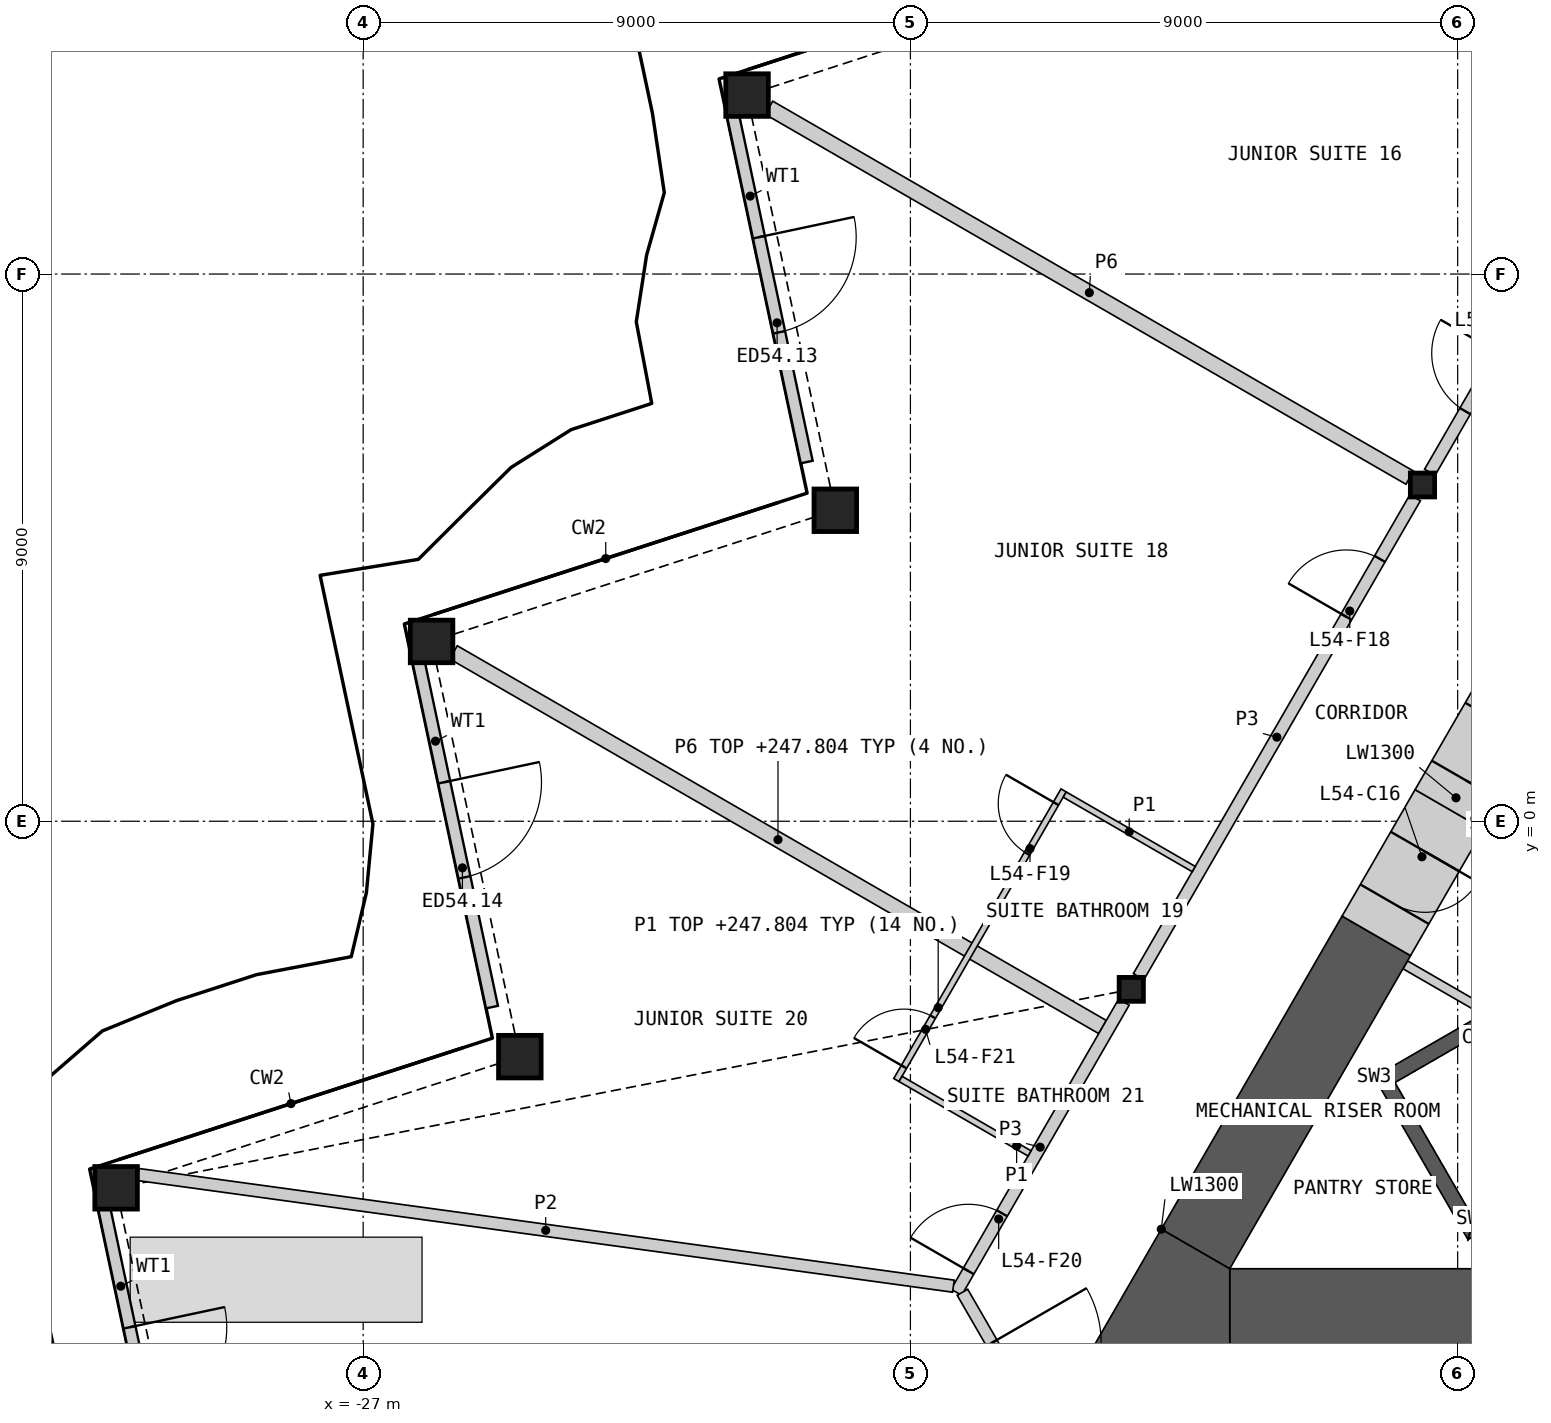
"""IFC4 building model, lengths in metres.
Left out: names, types, materials, properties, quantities, classifications, styles, units other than length and angle.
Written with IfcOpenShell. Run it as: python <this file> out.ifc"""

import sys

from ifc_helpers import new_model, si_unit, direction, frame, frame_2d, origin, origin_2d, place, context, subcontext, project, spatial, polyline, rectangle, hollow_rectangle, i_section, outline, extrude, element, fill, save


model = new_model("IFC4")
c1 = context("Model", 3, precision=1e-05, world=origin(), true_north=direction((0.0, 1.0)))
c2 = subcontext(c1, "Body", "Model", "MODEL_VIEW")
j1 = project(units=[si_unit("LENGTHUNIT", "METRE"), si_unit("PLANEANGLEUNIT", "RADIAN")], contexts=[c1])
p1 = place(None, origin())
s1 = spatial("IfcSite", under=j1, at=p1, CompositionType="ELEMENT")
p2 = place(p1, origin())
s2 = spatial("IfcBuilding", under=s1, at=p2, CompositionType="ELEMENT")
p3 = place(p2, frame((0.0, 0.0, 245.4)))
s3 = spatial("IfcBuildingStorey", under=s2, at=p3, CompositionType="ELEMENT", Elevation=245.4)
for number, where, z_axis, x_axis in (
    (1, (-20.687, 11.943, 0.0), (0.0, 0.0, 1.0), (1.0, 0.0, 0.0)),
    (2, (-19.235, 5.115, 0.0), (0.0, 0.0, 1.0), (1.0, 0.0, 0.0)),
    (3, (-25.875, 2.957, 0.0), (0.0, 0.0, 1.0), (1.0, 0.0, 0.0)),
    (4, (-24.423, -3.872, 0.0), (0.0, 0.0, 1.0), (1.0, 0.0, 0.0)),
    (5, (-31.063, -6.029, 0.0), (0.0, 0.0, 1.0), (1.0, 0.0, 0.0)),
):
    element("IfcColumn", number, at=place(p3, frame(where, z_axis=z_axis, x_axis=x_axis)), inside=s3, PredefinedType="COLUMN", context=c2, shape_type="SweptSolid", body=[
        extrude(hollow_rectangle(XDim=0.7, YDim=0.7, WallThickness=0.045, at=origin_2d()), origin(), (0.0, 0.0, 1.0), 3.6),
    ])
for number, where, z_axis, x_axis in (
    (6, (-9.578, 5.53, 0.0), (0.0, 0.0, 1.0), (1.0, 0.0, 0.0)),
    (7, (-14.368, -2.765, 0.0), (0.0, 0.0, 1.0), (1.0, 0.0, 0.0)),
):
    element("IfcColumn", number, at=place(p3, frame(where, z_axis=z_axis, x_axis=x_axis)), inside=s3, PredefinedType="COLUMN", context=c2, shape_type="SweptSolid", body=[
        extrude(i_section(OverallWidth=0.399, OverallDepth=0.393, WebThickness=0.023, FlangeThickness=0.037, at=origin_2d()), origin(), (0.0, 0.0, 1.0), 3.6),
    ])
p4 = place(p3, frame((-20.945, 11.74, 0.0), z_axis=(0.0, 0.0, 1.0), x_axis=(0.207920947907, -0.978145633033, 0.0)))
e8 = element("IfcWall", 8, at=p4, inside=s3, PredefinedType="SOLIDWALL", context=c2, shape_type="SweptSolid", body=[
    extrude(rectangle(XDim=5.963, YDim=0.2, at=frame_2d((2.981, 0.0))), origin(), (0.0, 0.0, 1.0), 2.701),
])
p5 = place(p4, frame((2.181, 0.0, 0.0)))
e9 = element("IfcOpeningElement", 9, at=p5, cuts=e8, PredefinedType="OPENING", context=c2, shape_type="SweptSolid", body=[
    extrude(rectangle(XDim=1.6, YDim=2.4, at=frame_2d((0.8, 1.2))), frame((0.0, 0.11, 0.0), z_axis=(0.0, -1.0, 0.0), x_axis=(1.0, 0.0, 0.0)), (0.0, 0.0, 1.0), 0.22),
])
p6 = place(p3, frame((-26.121, 2.775, 0.0), z_axis=(0.0, 0.0, 1.0), x_axis=(0.207881772083, -0.978153959679, 0.0)))
e10 = element("IfcWall", 10, at=p6, inside=s3, PredefinedType="SOLIDWALL", context=c2, shape_type="SweptSolid", body=[
    extrude(rectangle(XDim=5.963, YDim=0.2, at=frame_2d((2.981, 0.0))), origin(), (0.0, 0.0, 1.0), 2.701),
])
p7 = place(p6, frame((2.181, 0.0, 0.0)))
e11 = element("IfcOpeningElement", 11, at=p7, cuts=e10, PredefinedType="OPENING", context=c2, shape_type="SweptSolid", body=[
    extrude(rectangle(XDim=1.6, YDim=2.4, at=frame_2d((0.8, 1.2))), frame((0.0, 0.11, 0.0), z_axis=(0.0, -1.0, 0.0), x_axis=(1.0, 0.0, 0.0)), (0.0, 0.0, 1.0), 0.22),
])
p8 = place(p3, frame((-31.296, -6.189, 0.0), z_axis=(0.0, 0.0, 1.0), x_axis=(0.207920947907, -0.978145633033, 0.0)))
e12 = element("IfcWall", 12, at=p8, inside=s3, PredefinedType="SOLIDWALL", context=c2, shape_type="SweptSolid", body=[
    extrude(rectangle(XDim=5.963, YDim=0.2, at=frame_2d((2.981, 0.0))), origin(), (0.0, 0.0, 1.0), 2.701),
])
p9 = place(p8, frame((2.181, 0.0, 0.0)))
e13 = element("IfcOpeningElement", 13, at=p9, cuts=e12, PredefinedType="OPENING", context=c2, shape_type="SweptSolid", body=[
    extrude(rectangle(XDim=1.6, YDim=2.4, at=frame_2d((0.8, 1.2))), frame((0.0, 0.11, 0.0), z_axis=(0.0, -1.0, 0.0), x_axis=(1.0, 0.0, 0.0)), (0.0, 0.0, 1.0), 0.22),
])
p10 = place(p3, origin())
e14 = element("IfcWall", 14, at=p10, inside=s3, PredefinedType="SHEAR", context=c2, shape_type="SweptSolid", body=[
    extrude(outline(polyline([(-5.307, -1.281), (-10.374, -4.206), (-10.032, -4.298), (-5.182, -1.498), (-5.307, -1.281)])), origin(), (0.0, 0.0, 1.0), 3.25),
])
p11 = place(p3, origin())
e15 = element("IfcWall", 15, at=p11, inside=s3, PredefinedType="SHEAR", context=c2, shape_type="SweptSolid", body=[
    extrude(outline(polyline([(-10.374, -4.206), (-8.83, -6.881), (-8.738, -6.539), (-10.032, -4.298), (-10.374, -4.206)])), origin(), (0.0, 0.0, 1.0), 3.25),
])
p12 = place(p3, origin())
e16 = element("IfcWall", 16, at=p12, inside=s3, PredefinedType="SHEAR", context=c2, shape_type="SweptSolid", body=[
    extrude(outline(polyline([(-8.738, -6.539), (-8.83, -6.881), (-3.763, -3.956), (-3.888, -3.739), (-8.738, -6.539)])), origin(), (0.0, 0.0, 1.0), 3.25),
])
p13 = place(p3, frame((-9.862, -2.361, 0.0), z_axis=(0.0, 0.0, 1.0), x_axis=(0.865990094875, -0.500061151839, 0.0)))
e17 = element("IfcWall", 17, at=p13, inside=s3, PredefinedType="PARTITIONING", context=c2, shape_type="SweptSolid", body=[
    extrude(rectangle(XDim=1.56, YDim=0.15, at=frame_2d((0.78, 0.0))), origin(), (0.0, 0.0, 1.0), 3.25),
])
p14 = place(p3, frame((-12.748, -8.01, 0.0), z_axis=(0.0, 0.0, 1.0), x_axis=(1.0, 0.0, 0.0)))
e18 = element("IfcWall", 18, at=p14, inside=s3, PredefinedType="SHEAR", context=c2, shape_type="SweptSolid", body=[
    extrude(rectangle(XDim=4.26, YDim=1.3, at=frame_2d((2.13, 0.0))), origin(), (0.0, 0.0, 1.0), 3.25),
])
p15 = place(p3, frame((-10.338, -1.885, 0.0), z_axis=(0.0, 0.0, 1.0), x_axis=(-0.499975944838, -0.866039291593, 0.0)))
e19 = element("IfcWall", 19, at=p15, inside=s3, PredefinedType="SHEAR", context=c2, shape_type="SweptSolid", body=[
    extrude(rectangle(XDim=5.947, YDim=1.3, at=frame_2d((2.974, 0.0))), origin(), (0.0, 0.0, 1.0), 3.25),
])
p16 = place(p3, origin())
e20 = element("IfcWall", 20, at=p16, inside=s3, PredefinedType="SHEAR", context=c2, shape_type="SweptSolid", body=[
    extrude(outline(polyline([(-13.874, -6.71), (-12.748, -7.36), (-12.748, -8.66), (-15.0, -8.66), (-13.874, -6.71)])), origin(), (0.0, 0.0, 1.0), 3.25),
])
p17 = place(p3, frame((-9.137, 0.195, 0.0), z_axis=(0.0, 0.0, 1.0), x_axis=(-0.500009943768, -0.866019662671, 0.0)))
e21 = element("IfcWall", 21, at=p17, inside=s3, PredefinedType="SHEAR", context=c2, shape_type="SweptSolid", body=[
    extrude(rectangle(XDim=2.401, YDim=1.3, at=frame_2d((1.201, 0.0))), origin(), (0.0, 0.0, 1.0), 3.25),
])
p18 = place(p17, frame((0.8, 0.0, 0.0)))
e22 = element("IfcOpeningElement", 22, at=p18, cuts=e21, PredefinedType="OPENING", context=c2, shape_type="SweptSolid", body=[
    extrude(rectangle(XDim=1.0, YDim=2.1, at=frame_2d((0.5, 1.05))), frame((0.0, 0.66, 0.0), z_axis=(0.0, -1.0, 0.0), x_axis=(1.0, 0.0, 0.0)), (0.0, 0.0, 1.0), 1.32),
])
p19 = place(p3, frame((-8.037, 2.1, 0.0), z_axis=(0.0, 0.0, 1.0), x_axis=(-0.50002983664, -0.866008176907, 0.0)))
e23 = element("IfcWall", 23, at=p19, inside=s3, PredefinedType="SHEAR", context=c2, shape_type="SweptSolid", body=[
    extrude(rectangle(XDim=2.2, YDim=1.3, at=frame_2d((1.1, 0.0))), origin(), (0.0, 0.0, 1.0), 3.25),
])
p20 = place(p19, frame((0.55, 0.0, 0.0)))
e24 = element("IfcOpeningElement", 24, at=p20, cuts=e23, PredefinedType="OPENING", context=c2, shape_type="SweptSolid", body=[
    extrude(rectangle(XDim=1.1, YDim=2.1, at=frame_2d((0.55, 1.05))), frame((0.0, 0.66, 0.0), z_axis=(0.0, -1.0, 0.0), x_axis=(1.0, 0.0, 0.0)), (0.0, 0.0, 1.0), 1.32),
])
p21 = place(p3, frame((-25.515, 2.778, 0.0), z_axis=(0.0, 0.0, 1.0), x_axis=(0.866019666699, -0.500009936792, 0.0)))
e25 = element("IfcWall", 25, at=p21, inside=s3, PredefinedType="PARTITIONING", context=c2, shape_type="SweptSolid", body=[
    extrude(rectangle(XDim=12.325, YDim=0.25, at=frame_2d((6.163, 0.0))), origin(), (0.0, 0.0, 1.0), 2.404),
])
p22 = place(p3, frame((-20.327, 11.736, 0.0), z_axis=(0.0, 0.0, 1.0), x_axis=(0.866024549986, -0.50000147882, 0.0)))
e26 = element("IfcWall", 26, at=p22, inside=s3, PredefinedType="PARTITIONING", context=c2, shape_type="SweptSolid", body=[
    extrude(rectangle(XDim=12.169, YDim=0.25, at=frame_2d((6.084, 0.0))), origin(), (0.0, 0.0, 1.0), 2.404),
])
p23 = place(p3, frame((-14.247, -2.556, 0.0), z_axis=(0.0, 0.0, 1.0), x_axis=(0.49998193945, 0.866035830797, 0.0)))
e27 = element("IfcWall", 27, at=p23, inside=s3, PredefinedType="PARTITIONING", context=c2, shape_type="SweptSolid", body=[
    extrude(rectangle(XDim=9.094, YDim=0.2, at=frame_2d((4.547, 0.0))), origin(), (0.0, 0.0, 1.0), 3.25),
])
p24 = place(p23, frame((6.833, 0.0, 0.0)))
e28 = element("IfcOpeningElement", 28, at=p24, cuts=e27, PredefinedType="OPENING", context=c2, shape_type="SweptSolid", body=[
    extrude(rectangle(XDim=1.1, YDim=2.1, at=frame_2d((0.55, 1.05))), frame((0.0, 0.11, 0.0), z_axis=(0.0, -1.0, 0.0), x_axis=(1.0, 0.0, 0.0)), (0.0, 0.0, 1.0), 0.22),
])
p25 = place(p3, frame((-9.458, 5.74, 0.0), z_axis=(0.0, 0.0, 1.0), x_axis=(0.50000207303, 0.866024206917, 0.0)))
e29 = element("IfcWall", 29, at=p25, inside=s3, PredefinedType="PARTITIONING", context=c2, shape_type="SweptSolid", body=[
    extrude(rectangle(XDim=9.095, YDim=0.2, at=frame_2d((4.547, 0.0))), origin(), (0.0, 0.0, 1.0), 3.25),
])
p26 = place(p25, frame((1.162, 0.0, 0.0)))
e30 = element("IfcOpeningElement", 30, at=p26, cuts=e29, PredefinedType="OPENING", context=c2, shape_type="SweptSolid", body=[
    extrude(rectangle(XDim=1.1, YDim=2.1, at=frame_2d((0.55, 1.05))), frame((0.0, 0.11, 0.0), z_axis=(0.0, -1.0, 0.0), x_axis=(1.0, 0.0, 0.0)), (0.0, 0.0, 1.0), 0.22),
])
p27 = place(p3, frame((-17.244, -7.747, 0.0), z_axis=(0.0, 0.0, 1.0), x_axis=(0.500017753321, 0.866015153657, 0.0)))
e31 = element("IfcWall", 31, at=p27, inside=s3, PredefinedType="PARTITIONING", context=c2, shape_type="SweptSolid", body=[
    extrude(rectangle(XDim=5.51, YDim=0.2, at=frame_2d((2.755, 0.0))), origin(), (0.0, 0.0, 1.0), 3.25),
])
p28 = place(p27, frame((0.401, 0.0, 0.0)))
e32 = element("IfcOpeningElement", 32, at=p28, cuts=e31, PredefinedType="OPENING", context=c2, shape_type="SweptSolid", body=[
    extrude(rectangle(XDim=1.1, YDim=2.1, at=frame_2d((0.55, 1.05))), frame((0.0, 0.11, 0.0), z_axis=(0.0, -1.0, 0.0), x_axis=(1.0, 0.0, 0.0)), (0.0, 0.0, 1.0), 0.22),
])
p29 = place(p3, frame((-17.144, -7.747, 0.0), z_axis=(0.0, 0.0, 1.0), x_axis=(0.499961815444, -0.866047448526, 0.0)))
e33 = element("IfcWall", 33, at=p29, inside=s3, PredefinedType="PARTITIONING", context=c2, shape_type="SweptSolid", body=[
    extrude(rectangle(XDim=3.826, YDim=0.2, at=frame_2d((1.913, 0.0))), origin(), (0.0, 0.0, 1.0), 3.25),
])
p30 = place(p29, frame((0.962, 0.0, 0.0)))
e34 = element("IfcOpeningElement", 34, at=p30, cuts=e33, PredefinedType="OPENING", context=c2, shape_type="SweptSolid", body=[
    extrude(rectangle(XDim=1.8, YDim=2.1, at=frame_2d((0.9, 1.05))), frame((0.0, 0.11, 0.0), z_axis=(0.0, -1.0, 0.0), x_axis=(1.0, 0.0, 0.0)), (0.0, 0.0, 1.0), 0.22),
])
p31 = place(p3, frame((-30.703, -5.81, 0.0), z_axis=(0.0, 0.0, 1.0), x_axis=(0.99075075074, -0.135694325259, 0.0)))
e35 = element("IfcWall", 35, at=p31, inside=s3, PredefinedType="PARTITIONING", context=c2, shape_type="SweptSolid", body=[
    extrude(rectangle(XDim=13.535, YDim=0.2, at=frame_2d((6.768, 0.0))), origin(), (0.0, 0.0, 1.0), 2.404),
])
p32 = place(p3, frame((-18.231, -4.256, 0.0), z_axis=(0.0, 0.0, 1.0), x_axis=(0.500015767406, 0.866016300277, 0.0)))
e36 = element("IfcWall", 36, at=p32, inside=s3, PredefinedType="PARTITIONING", context=c2, shape_type="SweptSolid", body=[
    extrude(rectangle(XDim=5.5, YDim=0.1, at=frame_2d((2.75, 0.0))), origin(), (0.0, 0.0, 1.0), 2.404),
])
p33 = place(p32, frame((4.3, 0.0, 0.0)))
e37 = element("IfcOpeningElement", 37, at=p33, cuts=e36, PredefinedType="OPENING", context=c2, shape_type="SweptSolid", body=[
    extrude(rectangle(XDim=0.95, YDim=2.1, at=frame_2d((0.475, 1.05))), frame((0.0, 0.06, 0.0), z_axis=(0.0, -1.0, 0.0), x_axis=(1.0, 0.0, 0.0)), (0.0, 0.0, 1.0), 0.12),
])
p34 = place(p32, frame((0.25, 0.0, 0.0)))
e38 = element("IfcOpeningElement", 38, at=p34, cuts=e36, PredefinedType="OPENING", context=c2, shape_type="SweptSolid", body=[
    extrude(rectangle(XDim=0.95, YDim=2.1, at=frame_2d((0.475, 1.05))), frame((0.0, 0.06, 0.0), z_axis=(0.0, -1.0, 0.0), x_axis=(1.0, 0.0, 0.0)), (0.0, 0.0, 1.0), 0.12),
])
p35 = place(p3, frame((-15.462, 0.439, 0.0), z_axis=(0.0, 0.0, 1.0), x_axis=(0.865989751695, -0.500061746146, 0.0)))
e39 = element("IfcWall", 39, at=p35, inside=s3, PredefinedType="PARTITIONING", context=c2, shape_type="SweptSolid", body=[
    extrude(rectangle(XDim=2.45, YDim=0.1, at=frame_2d((1.225, 0.0))), origin(), (0.0, 0.0, 1.0), 2.404),
])
p36 = place(p3, frame((-18.163, -4.238, 0.0), z_axis=(0.0, 0.0, 1.0), x_axis=(0.866014668023, -0.500018594424, 0.0)))
e40 = element("IfcWall", 40, at=p36, inside=s3, PredefinedType="PARTITIONING", context=c2, shape_type="SweptSolid", body=[
    extrude(rectangle(XDim=2.45, YDim=0.1, at=frame_2d((1.225, 0.0))), origin(), (0.0, 0.0, 1.0), 2.404),
])
p37 = place(p5, origin())
e41 = element("IfcDoor", 41, at=p37, inside=s3, OperationType="DOUBLE_DOOR_SINGLE_SWING", PredefinedType="DOOR", context=c2, shape_type="SweptSolid", body=[
    extrude(rectangle(XDim=1.6, YDim=2.4, at=frame_2d((0.8, 1.2))), frame((0.0, 0.025, 0.0), z_axis=(0.0, -1.0, 0.0), x_axis=(1.0, 0.0, 0.0)), (0.0, 0.0, 1.0), 0.05),
])
fill(e9, e41)
p38 = place(p7, origin())
e42 = element("IfcDoor", 42, at=p38, inside=s3, OperationType="DOUBLE_DOOR_SINGLE_SWING", PredefinedType="DOOR", context=c2, shape_type="SweptSolid", body=[
    extrude(rectangle(XDim=1.6, YDim=2.4, at=frame_2d((0.8, 1.2))), frame((0.0, 0.025, 0.0), z_axis=(0.0, -1.0, 0.0), x_axis=(1.0, 0.0, 0.0)), (0.0, 0.0, 1.0), 0.05),
])
fill(e11, e42)
p39 = place(p9, origin())
e43 = element("IfcDoor", 43, at=p39, inside=s3, OperationType="DOUBLE_DOOR_SINGLE_SWING", PredefinedType="DOOR", context=c2, shape_type="SweptSolid", body=[
    extrude(rectangle(XDim=1.6, YDim=2.4, at=frame_2d((0.8, 1.2))), frame((0.0, 0.025, 0.0), z_axis=(0.0, -1.0, 0.0), x_axis=(1.0, 0.0, 0.0)), (0.0, 0.0, 1.0), 0.05),
])
fill(e13, e43)
p40 = place(p18, origin())
e44 = element("IfcDoor", 44, at=p40, inside=s3, OperationType="SINGLE_SWING_LEFT", PredefinedType="DOOR", context=c2, shape_type="SweptSolid", body=[
    extrude(rectangle(XDim=1.0, YDim=2.1, at=frame_2d((0.5, 1.05))), frame((0.0, 0.405, 0.0), z_axis=(0.0, -1.0, 0.0), x_axis=(1.0, 0.0, 0.0)), (0.0, 0.0, 1.0), 0.05),
])
fill(e22, e44)
p41 = place(p26, origin())
e45 = element("IfcDoor", 45, at=p41, inside=s3, OperationType="SINGLE_SWING_RIGHT", PredefinedType="DOOR", context=c2, shape_type="SweptSolid", body=[
    extrude(rectangle(XDim=1.1, YDim=2.1, at=frame_2d((0.55, 1.05))), frame((0.0, 0.025, 0.0), z_axis=(0.0, -1.0, 0.0), x_axis=(1.0, 0.0, 0.0)), (0.0, 0.0, 1.0), 0.05),
])
fill(e30, e45)
p42 = place(p24, origin())
e46 = element("IfcDoor", 46, at=p42, inside=s3, OperationType="SINGLE_SWING_LEFT", PredefinedType="DOOR", context=c2, shape_type="SweptSolid", body=[
    extrude(rectangle(XDim=1.1, YDim=2.1, at=frame_2d((0.55, 1.05))), frame((0.0, 0.025, 0.0), z_axis=(0.0, -1.0, 0.0), x_axis=(1.0, 0.0, 0.0)), (0.0, 0.0, 1.0), 0.05),
])
fill(e28, e46)
p43 = place(p33, origin())
e47 = element("IfcDoor", 47, at=p43, inside=s3, OperationType="SINGLE_SWING_RIGHT", PredefinedType="DOOR", context=c2, shape_type="SweptSolid", body=[
    extrude(rectangle(XDim=0.95, YDim=2.1, at=frame_2d((0.475, 1.05))), frame((0.0, 0.025, 0.0), z_axis=(0.0, -1.0, 0.0), x_axis=(1.0, 0.0, 0.0)), (0.0, 0.0, 1.0), 0.05),
])
fill(e37, e47)
p44 = place(p28, origin())
e48 = element("IfcDoor", 48, at=p44, inside=s3, OperationType="SINGLE_SWING_LEFT", PredefinedType="DOOR", context=c2, shape_type="SweptSolid", body=[
    extrude(rectangle(XDim=1.1, YDim=2.1, at=frame_2d((0.55, 1.05))), frame((0.0, 0.025, 0.0), z_axis=(0.0, -1.0, 0.0), x_axis=(1.0, 0.0, 0.0)), (0.0, 0.0, 1.0), 0.05),
])
fill(e32, e48)
p45 = place(p34, origin())
e49 = element("IfcDoor", 49, at=p45, inside=s3, OperationType="SINGLE_SWING_LEFT", PredefinedType="DOOR", context=c2, shape_type="SweptSolid", body=[
    extrude(rectangle(XDim=0.95, YDim=2.1, at=frame_2d((0.475, 1.05))), frame((0.0, 0.025, 0.0), z_axis=(0.0, -1.0, 0.0), x_axis=(1.0, 0.0, 0.0)), (0.0, 0.0, 1.0), 0.05),
])
fill(e38, e49)
p46 = place(p30, origin())
e50 = element("IfcDoor", 50, at=p46, inside=s3, OperationType="DOUBLE_DOOR_SINGLE_SWING", PredefinedType="DOOR", context=c2, shape_type="SweptSolid", body=[
    extrude(rectangle(XDim=1.8, YDim=2.1, at=frame_2d((0.9, 1.05))), frame((0.0, 0.025, 0.0), z_axis=(0.0, -1.0, 0.0), x_axis=(1.0, 0.0, 0.0)), (0.0, 0.0, 1.0), 0.05),
])
fill(e34, e50)
save(model, sys.argv[1])
